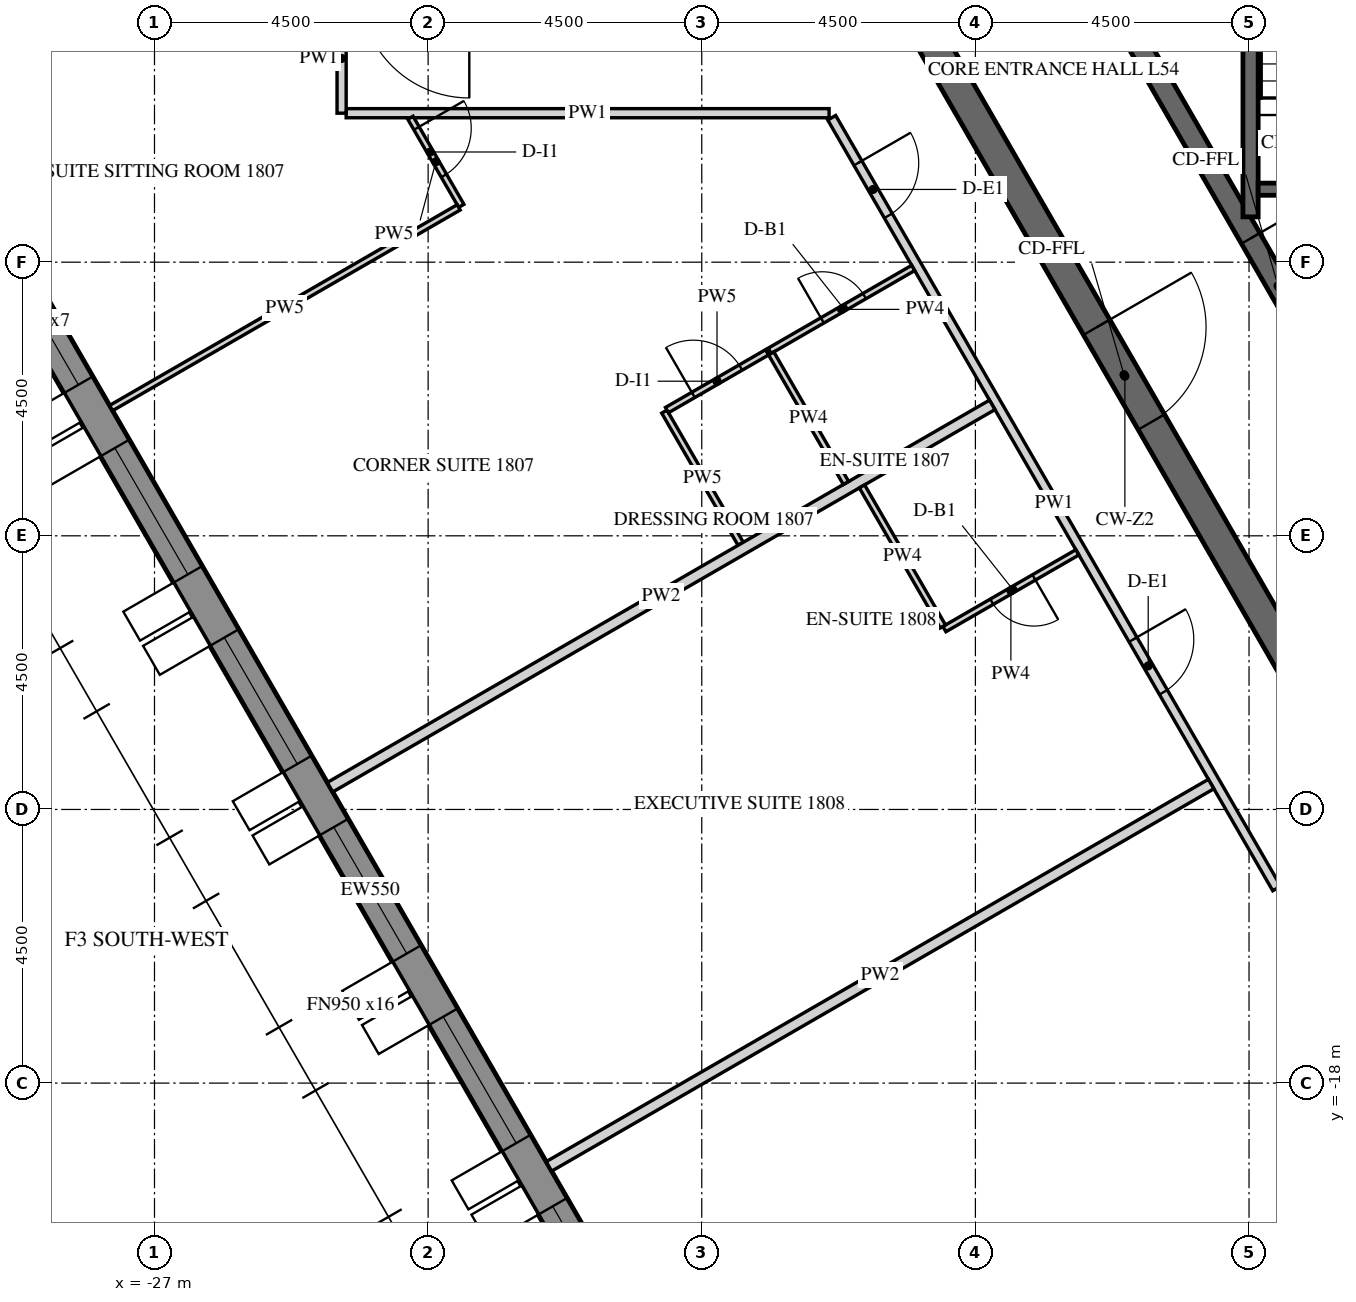
"""IFC4 building model, lengths in metres.
Left out: names, types, materials, properties, quantities, classifications, styles, units other than length and angle.
Written with IfcOpenShell. Run it as: python <this file> out.ifc"""

import sys

from ifc_helpers import new_model, si_unit, direction, frame, frame_2d, origin, place, context, subcontext, project, spatial, polyline, rectangle, outline, extrude, element, fill, save


model = new_model("IFC4")
c1 = context("Model", 3, precision=1e-05, world=origin(), true_north=direction((0.0, 1.0)))
c2 = subcontext(c1, "Body", "Model", "MODEL_VIEW")
j1 = project(units=[si_unit("LENGTHUNIT", "METRE"), si_unit("PLANEANGLEUNIT", "RADIAN")], contexts=[c1])
p1 = place(None, origin())
s1 = spatial("IfcSite", under=j1, at=p1, CompositionType="ELEMENT")
p2 = place(p1, origin())
s2 = spatial("IfcBuilding", under=s1, at=p2, CompositionType="ELEMENT")
p3 = place(p2, frame((0.0, 0.0, 226.8)))
s3 = spatial("IfcBuildingStorey", under=s2, at=p3, CompositionType="ELEMENT", Elevation=226.8)
p4 = place(p3, frame((-30.391, -2.811, -0.15), z_axis=(0.0, 0.0, 1.0), x_axis=(0.499998569178, -0.866026229868, 0.0)))
e1 = element("IfcWall", 1, at=p4, inside=s3, PredefinedType="SOLIDWALL", context=c2, shape_type="SweptSolid", body=[
    extrude(outline(polyline([(-0.022, -0.275), (27.783, -0.275), (27.732, 0.275), (0.022, 0.275), (-0.022, -0.275)])), origin(), (0.0, 0.0, 1.0), 3.9),
])
p5 = place(p4, frame((1.879, 0.0, 1.05)))
e2 = element("IfcOpeningElement", 2, at=p5, cuts=e1, PredefinedType="OPENING", context=c2, shape_type="SweptSolid", body=[
    extrude(rectangle(XDim=2.4, YDim=2.4, at=frame_2d((1.2, 1.2))), frame((0.0, 0.285, 0.0), z_axis=(0.0, -1.0, 0.0), x_axis=(1.0, 0.0, 0.0)), (0.0, 0.0, 1.0), 0.57),
])
p6 = place(p4, frame((5.479, 0.0, 1.05)))
e3 = element("IfcOpeningElement", 3, at=p6, cuts=e1, PredefinedType="OPENING", context=c2, shape_type="SweptSolid", body=[
    extrude(rectangle(XDim=2.4, YDim=2.4, at=frame_2d((1.2, 1.2))), frame((0.0, 0.285, 0.0), z_axis=(0.0, -1.0, 0.0), x_axis=(1.0, 0.0, 0.0)), (0.0, 0.0, 1.0), 0.57),
])
p7 = place(p4, frame((9.079, 0.0, 1.05)))
e4 = element("IfcOpeningElement", 4, at=p7, cuts=e1, PredefinedType="OPENING", context=c2, shape_type="SweptSolid", body=[
    extrude(rectangle(XDim=2.4, YDim=2.4, at=frame_2d((1.2, 1.2))), frame((0.0, 0.285, 0.0), z_axis=(0.0, -1.0, 0.0), x_axis=(1.0, 0.0, 0.0)), (0.0, 0.0, 1.0), 0.57),
])
p8 = place(p4, frame((12.679, 0.0, 1.05)))
e5 = element("IfcOpeningElement", 5, at=p8, cuts=e1, PredefinedType="OPENING", context=c2, shape_type="SweptSolid", body=[
    extrude(rectangle(XDim=2.4, YDim=2.4, at=frame_2d((1.2, 1.2))), frame((0.0, 0.285, 0.0), z_axis=(0.0, -1.0, 0.0), x_axis=(1.0, 0.0, 0.0)), (0.0, 0.0, 1.0), 0.57),
])
p9 = place(p4, frame((16.279, 0.0, 1.05)))
e6 = element("IfcOpeningElement", 6, at=p9, cuts=e1, PredefinedType="OPENING", context=c2, shape_type="SweptSolid", body=[
    extrude(rectangle(XDim=2.4, YDim=2.4, at=frame_2d((1.2, 1.2))), frame((0.0, 0.285, 0.0), z_axis=(0.0, -1.0, 0.0), x_axis=(1.0, 0.0, 0.0)), (0.0, 0.0, 1.0), 0.57),
])
p10 = place(p4, frame((19.879, 0.0, 1.05)))
e7 = element("IfcOpeningElement", 7, at=p10, cuts=e1, PredefinedType="OPENING", context=c2, shape_type="SweptSolid", body=[
    extrude(rectangle(XDim=2.4, YDim=2.4, at=frame_2d((1.2, 1.2))), frame((0.0, 0.285, 0.0), z_axis=(0.0, -1.0, 0.0), x_axis=(1.0, 0.0, 0.0)), (0.0, 0.0, 1.0), 0.57),
])
p11 = place(p4, frame((23.479, 0.0, 1.05)))
e8 = element("IfcOpeningElement", 8, at=p11, cuts=e1, PredefinedType="OPENING", context=c2, shape_type="SweptSolid", body=[
    extrude(rectangle(XDim=2.4, YDim=2.4, at=frame_2d((1.2, 1.2))), frame((0.0, 0.285, 0.0), z_axis=(0.0, -1.0, 0.0), x_axis=(1.0, 0.0, 0.0)), (0.0, 0.0, 1.0), 0.57),
])
p12 = place(p3, frame((-14.722, 0.0, -0.15), z_axis=(0.0, 0.0, 1.0), x_axis=(0.50000571537, -0.866022103989, 0.0)))
e9 = element("IfcWall", 9, at=p12, inside=s3, PredefinedType="SHEAR", context=c2, shape_type="SweptSolid", body=[
    extrude(outline(polyline([(-0.144, -0.25), (14.867, -0.25), (14.578, 0.25), (0.144, 0.25), (-0.144, -0.25)])), origin(), (0.0, 0.0, 1.0), 3.9),
])
p13 = place(p12, frame((6.432, 0.0, 0.15)))
e10 = element("IfcOpeningElement", 10, at=p13, cuts=e9, PredefinedType="OPENING", context=c2, shape_type="SweptSolid", body=[
    extrude(rectangle(XDim=1.8, YDim=2.4, at=frame_2d((0.9, 1.2))), frame((0.0, 0.26, 0.0), z_axis=(0.0, -1.0, 0.0), x_axis=(1.0, 0.0, 0.0)), (0.0, 0.0, 1.0), 0.52),
])
p14 = place(p3, frame((-11.345, 0.0, -0.15), z_axis=(0.0, 0.0, 1.0), x_axis=(0.499995046907, -0.866028263435, 0.0)))
e11 = element("IfcWall", 11, at=p14, inside=s3, PredefinedType="SHEAR", context=c2, shape_type="SweptSolid", body=[
    extrude(outline(polyline([(-0.101, -0.175), (11.446, -0.175), (11.244, 0.175), (0.101, 0.175), (-0.101, -0.175)])), origin(), (0.0, 0.0, 1.0), 3.9),
])
p15 = place(p14, frame((4.744, 0.0, 0.15)))
e12 = element("IfcOpeningElement", 12, at=p15, cuts=e11, PredefinedType="OPENING", context=c2, shape_type="SweptSolid", body=[
    extrude(rectangle(XDim=1.8, YDim=2.4, at=frame_2d((0.9, 1.2))), frame((0.0, 0.185, 0.0), z_axis=(0.0, -1.0, 0.0), x_axis=(1.0, 0.0, 0.0)), (0.0, 0.0, 1.0), 0.37),
])
p16 = place(p3, frame((-8.975, -3.755, -0.25), z_axis=(0.0, 0.0, 1.0), x_axis=(0.0, 1.0, 0.0)))
e13 = element("IfcWall", 13, at=p16, inside=s3, PredefinedType="SHEAR", context=c2, shape_type="SweptSolid", body=[
    extrude(rectangle(XDim=7.51, YDim=0.25, at=frame_2d((3.755, 0.0))), origin(), (0.0, 0.0, 1.0), 3.9),
])
p17 = place(p3, frame((-8.85, -3.3, -0.25), z_axis=(0.0, 0.0, 1.0), x_axis=(1.0, 0.0, 0.0)))
e14 = element("IfcWall", 14, at=p17, inside=s3, PredefinedType="SHEAR", context=c2, shape_type="SweptSolid", body=[
    extrude(rectangle(XDim=2.95, YDim=0.2, at=frame_2d((1.475, 0.0))), origin(), (0.0, 0.0, 1.0), 3.9),
])
p18 = place(p17, frame((0.875, 0.0, 0.25)))
e15 = element("IfcOpeningElement", 15, at=p18, cuts=e14, PredefinedType="OPENING", context=c2, shape_type="SweptSolid", body=[
    extrude(rectangle(XDim=1.2, YDim=2.4, at=frame_2d((0.6, 1.2))), frame((0.0, 0.11, 0.0), z_axis=(0.0, -1.0, 0.0), x_axis=(1.0, 0.0, 0.0)), (0.0, 0.0, 1.0), 0.22),
])
p19 = place(p3, frame((-23.848, -2.05, 0.0), z_axis=(0.0, 0.0, 1.0), x_axis=(1.0, 0.0, 0.0)))
e16 = element("IfcWall", 16, at=p19, inside=s3, PredefinedType="PARTITIONING", context=c2, shape_type="SweptSolid", body=[
    extrude(rectangle(XDim=7.942, YDim=0.15, at=frame_2d((3.971, 0.0))), origin(), (0.0, 0.0, 1.0), 2.988),
])
p20 = place(p3, frame((-15.863, -2.125, 0.0), z_axis=(0.0, 0.0, 1.0), x_axis=(0.500008833422, -0.866020303746, 0.0)))
e17 = element("IfcWall", 17, at=p20, inside=s3, PredefinedType="PARTITIONING", context=c2, shape_type="SweptSolid", body=[
    extrude(rectangle(XDim=14.636, YDim=0.15, at=frame_2d((7.318, 0.0))), origin(), (0.0, 0.0, 1.0), 2.988),
])
p21 = place(p20, frame((0.861, 0.0, 0.0)))
e18 = element("IfcOpeningElement", 18, at=p21, cuts=e17, PredefinedType="OPENING", context=c2, shape_type="SweptSolid", body=[
    extrude(rectangle(XDim=1.0, YDim=2.1, at=frame_2d((0.5, 1.05))), frame((0.0, 0.085, 0.0), z_axis=(0.0, -1.0, 0.0), x_axis=(1.0, 0.0, 0.0)), (0.0, 0.0, 1.0), 0.17),
])
p22 = place(p20, frame((9.909, 0.0, 0.0)))
e19 = element("IfcOpeningElement", 19, at=p22, cuts=e17, PredefinedType="OPENING", context=c2, shape_type="SweptSolid", body=[
    extrude(rectangle(XDim=1.0, YDim=2.1, at=frame_2d((0.5, 1.05))), frame((0.0, 0.085, 0.0), z_axis=(0.0, -1.0, 0.0), x_axis=(1.0, 0.0, 0.0)), (0.0, 0.0, 1.0), 0.17),
])
p23 = place(p3, frame((-23.923, -0.25, 0.0), z_axis=(0.0, 0.0, 1.0), x_axis=(0.0, -1.0, 0.0)))
e20 = element("IfcWall", 20, at=p23, inside=s3, PredefinedType="PARTITIONING", context=c2, shape_type="SweptSolid", body=[
    extrude(rectangle(XDim=1.8, YDim=0.15, at=frame_2d((0.9, 0.0))), origin(), (0.0, 0.0, 1.0), 2.988),
])
p24 = place(p3, frame((-16.883, -5.958, 0.0), z_axis=(0.0, 0.0, 1.0), x_axis=(0.866012511928, 0.500022328685, 0.0)))
e21 = element("IfcWall", 21, at=p24, inside=s3, PredefinedType="PARTITIONING", context=c2, shape_type="SweptSolid", body=[
    extrude(rectangle(XDim=2.725, YDim=0.1, at=frame_2d((1.363, 0.0))), origin(), (0.0, 0.0, 1.0), 2.988),
])
p25 = place(p24, frame((1.0, 0.0, 0.0)))
e22 = element("IfcOpeningElement", 22, at=p25, cuts=e21, PredefinedType="OPENING", context=c2, shape_type="SweptSolid", body=[
    extrude(rectangle(XDim=0.8, YDim=2.1, at=frame_2d((0.4, 1.05))), frame((0.0, 0.06, 0.0), z_axis=(0.0, -1.0, 0.0), x_axis=(1.0, 0.0, 0.0)), (0.0, 0.0, 1.0), 0.12),
])
p26 = place(p3, frame((-17.36, -9.131, 0.0), z_axis=(0.0, 0.0, 1.0), x_axis=(-0.50001992892, 0.866013897511, 0.0)))
e23 = element("IfcWall", 23, at=p26, inside=s3, PredefinedType="PARTITIONING", context=c2, shape_type="SweptSolid", body=[
    extrude(rectangle(XDim=2.51, YDim=0.1, at=frame_2d((1.255, 0.0))), origin(), (0.0, 0.0, 1.0), 2.988),
])
p27 = place(p3, frame((-18.572, -6.933, 0.0), z_axis=(0.0, 0.0, 1.0), x_axis=(0.86601224135, 0.500022797313, 0.0)))
e24 = element("IfcWall", 24, at=p27, inside=s3, PredefinedType="PARTITIONING", context=c2, shape_type="SweptSolid", body=[
    extrude(rectangle(XDim=1.9, YDim=0.1, at=frame_2d((0.95, 0.0))), origin(), (0.0, 0.0, 1.0), 2.988),
])
p28 = place(p27, frame((0.5, 0.0, 0.0)))
e25 = element("IfcOpeningElement", 25, at=p28, cuts=e24, PredefinedType="OPENING", context=c2, shape_type="SweptSolid", body=[
    extrude(rectangle(XDim=0.9, YDim=2.1, at=frame_2d((0.45, 1.05))), frame((0.0, 0.06, 0.0), z_axis=(0.0, -1.0, 0.0), x_axis=(1.0, 0.0, 0.0)), (0.0, 0.0, 1.0), 0.12),
])
p29 = place(p3, frame((-22.791, -2.125, 0.0), z_axis=(0.0, 0.0, 1.0), x_axis=(0.500046635412, -0.865998477143, 0.0)))
e26 = element("IfcWall", 26, at=p29, inside=s3, PredefinedType="PARTITIONING", context=c2, shape_type="SweptSolid", body=[
    extrude(rectangle(XDim=1.673, YDim=0.1, at=frame_2d((0.836, 0.0))), origin(), (0.0, 0.0, 1.0), 2.988),
])
p30 = place(p29, frame((0.2, 0.0, 0.0)))
e27 = element("IfcOpeningElement", 27, at=p30, cuts=e26, PredefinedType="OPENING", context=c2, shape_type="SweptSolid", body=[
    extrude(rectangle(XDim=0.9, YDim=2.1, at=frame_2d((0.45, 1.05))), frame((0.0, 0.06, 0.0), z_axis=(0.0, -1.0, 0.0), x_axis=(1.0, 0.0, 0.0)), (0.0, 0.0, 1.0), 0.12),
])
p31 = place(p3, frame((-21.998, -3.599, 0.0), z_axis=(0.0, 0.0, 1.0), x_axis=(-0.866014946329, -0.500018112406, 0.0)))
e28 = element("IfcWall", 28, at=p31, inside=s3, PredefinedType="PARTITIONING", context=c2, shape_type="SweptSolid", body=[
    extrude(rectangle(XDim=6.6, YDim=0.1, at=frame_2d((3.3, 0.0))), origin(), (0.0, 0.0, 1.0), 2.988),
])
p32 = place(p3, frame((-24.114, -13.134, 0.0), z_axis=(0.0, 0.0, 1.0), x_axis=(0.866024255907, 0.500001988177, 0.0)))
e29 = element("IfcWall", 29, at=p32, inside=s3, PredefinedType="PARTITIONING", context=c2, shape_type="SweptSolid", body=[
    extrude(rectangle(XDim=12.575, YDim=0.18, at=frame_2d((6.288, 0.0))), origin(), (0.0, 0.0, 1.0), 2.988),
])
p33 = place(p3, frame((-16.858, -6.001, 0.0), z_axis=(0.0, 0.0, 1.0), x_axis=(0.500003092839, -0.866023618125, 0.0)))
e30 = element("IfcWall", 30, at=p33, inside=s3, PredefinedType="PARTITIONING", context=c2, shape_type="SweptSolid", body=[
    extrude(rectangle(XDim=2.46, YDim=0.1, at=frame_2d((1.23, 0.0))), origin(), (0.0, 0.0, 1.0), 2.988),
])
p34 = place(p3, frame((-11.823, -9.272, 0.0), z_axis=(0.0, 0.0, 1.0), x_axis=(-0.866039067339, -0.499976333282, 0.0)))
e31 = element("IfcWall", 31, at=p34, inside=s3, PredefinedType="PARTITIONING", context=c2, shape_type="SweptSolid", body=[
    extrude(rectangle(XDim=2.525, YDim=0.1, at=frame_2d((1.262, 0.0))), origin(), (0.0, 0.0, 1.0), 2.988),
])
p35 = place(p34, frame((0.825, 0.0, 0.0)))
e32 = element("IfcOpeningElement", 32, at=p35, cuts=e31, PredefinedType="OPENING", context=c2, shape_type="SweptSolid", body=[
    extrude(rectangle(XDim=0.8, YDim=2.1, at=frame_2d((0.4, 1.05))), frame((0.0, 0.06, 0.0), z_axis=(0.0, -1.0, 0.0), x_axis=(1.0, 0.0, 0.0)), (0.0, 0.0, 1.0), 0.12),
])
p36 = place(p3, frame((-14.035, -10.491, 0.0), z_axis=(0.0, 0.0, 1.0), x_axis=(-0.50004820116, 0.865997573043, 0.0)))
e33 = element("IfcWall", 33, at=p36, inside=s3, PredefinedType="PARTITIONING", context=c2, shape_type="SweptSolid", body=[
    extrude(rectangle(XDim=2.66, YDim=0.1, at=frame_2d((1.33, 0.0))), origin(), (0.0, 0.0, 1.0), 2.988),
])
p37 = place(p3, frame((-20.513, -19.37, 0.0), z_axis=(0.0, 0.0, 1.0), x_axis=(0.866019402111, 0.500010395058, 0.0)))
e34 = element("IfcWall", 34, at=p37, inside=s3, PredefinedType="PARTITIONING", context=c2, shape_type="SweptSolid", body=[
    extrude(rectangle(XDim=12.575, YDim=0.18, at=frame_2d((6.288, 0.0))), origin(), (0.0, 0.0, 1.0), 2.988),
])
p38 = place(p5, frame((0.0, 0.205, 0.0)))
e35 = element("IfcWindow", 35, at=p38, inside=s3, PartitioningType="DOUBLE_PANEL_VERTICAL", PredefinedType="WINDOW", context=c2, shape_type="SweptSolid", body=[
    extrude(rectangle(XDim=2.4, YDim=2.4, at=frame_2d((1.2, 1.2))), frame((0.0, 0.03, 0.0), z_axis=(0.0, -1.0, 0.0), x_axis=(1.0, 0.0, 0.0)), (0.0, 0.0, 1.0), 0.06),
])
fill(e2, e35)
p39 = place(p6, frame((0.0, 0.205, 0.0)))
e36 = element("IfcWindow", 36, at=p39, inside=s3, PartitioningType="DOUBLE_PANEL_VERTICAL", PredefinedType="WINDOW", context=c2, shape_type="SweptSolid", body=[
    extrude(rectangle(XDim=2.4, YDim=2.4, at=frame_2d((1.2, 1.2))), frame((0.0, 0.03, 0.0), z_axis=(0.0, -1.0, 0.0), x_axis=(1.0, 0.0, 0.0)), (0.0, 0.0, 1.0), 0.06),
])
fill(e3, e36)
p40 = place(p7, frame((0.0, 0.205, 0.0)))
e37 = element("IfcWindow", 37, at=p40, inside=s3, PartitioningType="DOUBLE_PANEL_VERTICAL", PredefinedType="WINDOW", context=c2, shape_type="SweptSolid", body=[
    extrude(rectangle(XDim=2.4, YDim=2.4, at=frame_2d((1.2, 1.2))), frame((0.0, 0.03, 0.0), z_axis=(0.0, -1.0, 0.0), x_axis=(1.0, 0.0, 0.0)), (0.0, 0.0, 1.0), 0.06),
])
fill(e4, e37)
p41 = place(p8, frame((0.0, 0.205, 0.0)))
e38 = element("IfcWindow", 38, at=p41, inside=s3, PartitioningType="DOUBLE_PANEL_VERTICAL", PredefinedType="WINDOW", context=c2, shape_type="SweptSolid", body=[
    extrude(rectangle(XDim=2.4, YDim=2.4, at=frame_2d((1.2, 1.2))), frame((0.0, 0.03, 0.0), z_axis=(0.0, -1.0, 0.0), x_axis=(1.0, 0.0, 0.0)), (0.0, 0.0, 1.0), 0.06),
])
fill(e5, e38)
p42 = place(p9, frame((0.0, 0.205, 0.0)))
e39 = element("IfcWindow", 39, at=p42, inside=s3, PartitioningType="DOUBLE_PANEL_VERTICAL", PredefinedType="WINDOW", context=c2, shape_type="SweptSolid", body=[
    extrude(rectangle(XDim=2.4, YDim=2.4, at=frame_2d((1.2, 1.2))), frame((0.0, 0.03, 0.0), z_axis=(0.0, -1.0, 0.0), x_axis=(1.0, 0.0, 0.0)), (0.0, 0.0, 1.0), 0.06),
])
fill(e6, e39)
p43 = place(p10, frame((0.0, 0.205, 0.0)))
e40 = element("IfcWindow", 40, at=p43, inside=s3, PartitioningType="DOUBLE_PANEL_VERTICAL", PredefinedType="WINDOW", context=c2, shape_type="SweptSolid", body=[
    extrude(rectangle(XDim=2.4, YDim=2.4, at=frame_2d((1.2, 1.2))), frame((0.0, 0.03, 0.0), z_axis=(0.0, -1.0, 0.0), x_axis=(1.0, 0.0, 0.0)), (0.0, 0.0, 1.0), 0.06),
])
fill(e7, e40)
p44 = place(p13, origin())
e41 = element("IfcDoor", 41, at=p44, inside=s3, OperationType="DOUBLE_DOOR_SINGLE_SWING", PredefinedType="DOOR", context=c2, shape_type="SweptSolid", body=[
    extrude(rectangle(XDim=1.8, YDim=2.4, at=frame_2d((0.9, 1.2))), frame((0.0, 0.025, 0.0), z_axis=(0.0, -1.0, 0.0), x_axis=(1.0, 0.0, 0.0)), (0.0, 0.0, 1.0), 0.05),
])
fill(e10, e41)
p45 = place(p15, origin())
e42 = element("IfcDoor", 42, at=p45, inside=s3, OperationType="DOUBLE_DOOR_SINGLE_SWING", PredefinedType="DOOR", context=c2, shape_type="SweptSolid", body=[
    extrude(rectangle(XDim=1.8, YDim=2.4, at=frame_2d((0.9, 1.2))), frame((0.0, 0.025, 0.0), z_axis=(0.0, -1.0, 0.0), x_axis=(1.0, 0.0, 0.0)), (0.0, 0.0, 1.0), 0.05),
])
fill(e12, e42)
p46 = place(p21, origin())
e43 = element("IfcDoor", 43, at=p46, inside=s3, OperationType="SINGLE_SWING_RIGHT", PredefinedType="DOOR", context=c2, shape_type="SweptSolid", body=[
    extrude(rectangle(XDim=1.0, YDim=2.1, at=frame_2d((0.5, 1.05))), frame((0.0, 0.025, 0.0), z_axis=(0.0, -1.0, 0.0), x_axis=(1.0, 0.0, 0.0)), (0.0, 0.0, 1.0), 0.05),
])
fill(e18, e43)
p47 = place(p25, origin())
e44 = element("IfcDoor", 44, at=p47, inside=s3, OperationType="SINGLE_SWING_LEFT", PredefinedType="DOOR", context=c2, shape_type="SweptSolid", body=[
    extrude(rectangle(XDim=0.8, YDim=2.1, at=frame_2d((0.4, 1.05))), frame((0.0, 0.025, 0.0), z_axis=(0.0, -1.0, 0.0), x_axis=(1.0, 0.0, 0.0)), (0.0, 0.0, 1.0), 0.05),
])
fill(e22, e44)
p48 = place(p28, origin())
e45 = element("IfcDoor", 45, at=p48, inside=s3, OperationType="SINGLE_SWING_RIGHT", PredefinedType="DOOR", context=c2, shape_type="SweptSolid", body=[
    extrude(rectangle(XDim=0.9, YDim=2.1, at=frame_2d((0.45, 1.05))), frame((0.0, 0.025, 0.0), z_axis=(0.0, -1.0, 0.0), x_axis=(1.0, 0.0, 0.0)), (0.0, 0.0, 1.0), 0.05),
])
fill(e25, e45)
p49 = place(p30, origin())
e46 = element("IfcDoor", 46, at=p49, inside=s3, OperationType="SINGLE_SWING_RIGHT", PredefinedType="DOOR", context=c2, shape_type="SweptSolid", body=[
    extrude(rectangle(XDim=0.9, YDim=2.1, at=frame_2d((0.45, 1.05))), frame((0.0, 0.025, 0.0), z_axis=(0.0, -1.0, 0.0), x_axis=(1.0, 0.0, 0.0)), (0.0, 0.0, 1.0), 0.05),
])
fill(e27, e46)
p50 = place(p22, origin())
e47 = element("IfcDoor", 47, at=p50, inside=s3, OperationType="SINGLE_SWING_RIGHT", PredefinedType="DOOR", context=c2, shape_type="SweptSolid", body=[
    extrude(rectangle(XDim=1.0, YDim=2.1, at=frame_2d((0.5, 1.05))), frame((0.0, 0.025, 0.0), z_axis=(0.0, -1.0, 0.0), x_axis=(1.0, 0.0, 0.0)), (0.0, 0.0, 1.0), 0.05),
])
fill(e19, e47)
p51 = place(p35, origin())
e48 = element("IfcDoor", 48, at=p51, inside=s3, OperationType="SINGLE_SWING_RIGHT", PredefinedType="DOOR", context=c2, shape_type="SweptSolid", body=[
    extrude(rectangle(XDim=0.8, YDim=2.1, at=frame_2d((0.4, 1.05))), frame((0.0, 0.025, 0.0), z_axis=(0.0, -1.0, 0.0), x_axis=(1.0, 0.0, 0.0)), (0.0, 0.0, 1.0), 0.05),
])
fill(e32, e48)
save(model, sys.argv[1])
